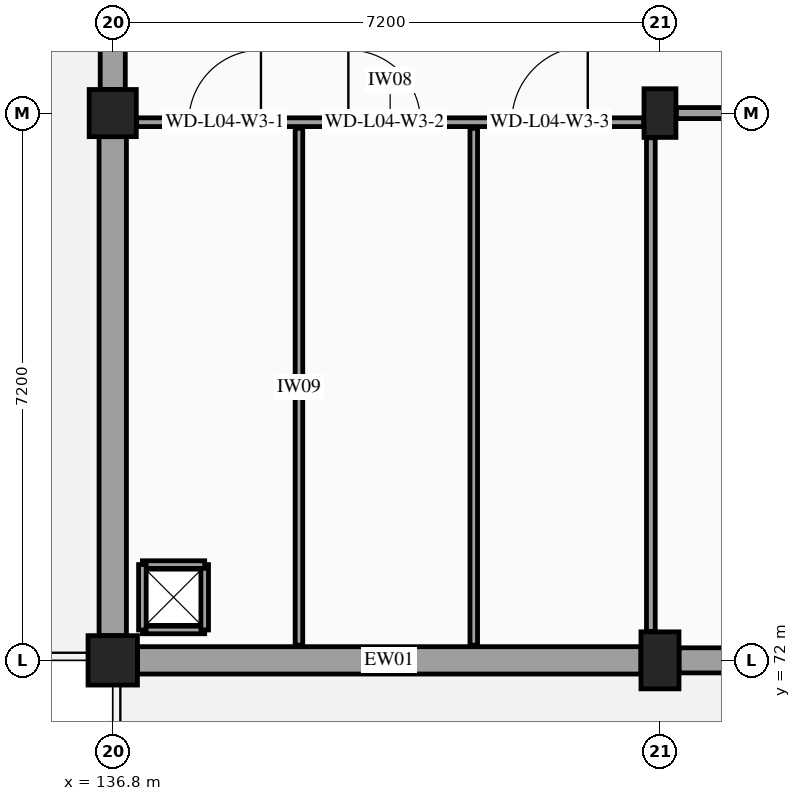
"""IFC4 building model, lengths in metres.
Left out: names, types, materials, properties, quantities, classifications, styles, units other than length and angle.
Written with IfcOpenShell. Run it as: python <this file> out.ifc"""

import sys

from ifc_helpers import new_model, si_unit, direction, frame, frame_2d, origin, origin_2d, place, context, subcontext, project, spatial, rectangle, extrude, element, fill, save


model = new_model("IFC4")
c1 = context("Model", 3, precision=1e-05, world=origin(), true_north=direction((0.0, 1.0)))
c2 = subcontext(c1, "Body", "Model", "MODEL_VIEW")
j1 = project(units=[si_unit("LENGTHUNIT", "METRE"), si_unit("PLANEANGLEUNIT", "RADIAN")], contexts=[c1])
p1 = place(None, origin())
s1 = spatial("IfcSite", under=j1, at=p1, CompositionType="ELEMENT")
p2 = place(p1, origin())
s2 = spatial("IfcBuilding", under=s1, at=p2, CompositionType="ELEMENT")
p3 = place(p2, frame((0.0, 0.0, 18.6)))
s3 = spatial("IfcBuildingStorey", under=s2, at=p3, CompositionType="ELEMENT", Elevation=18.6)
p4 = place(p3, frame((136.8, 72.0, 0.0), z_axis=(0.0, 0.0, 1.0), x_axis=(1.0, 0.0, 0.0)))
e1 = element("IfcColumn", 1, at=p4, inside=s3, PredefinedType="COLUMN", context=c2, shape_type="SweptSolid", body=[
    extrude(rectangle(XDim=0.65, YDim=0.65, at=origin_2d()), origin(), (0.0, 0.0, 1.0), 4.2),
])
p5 = place(p3, frame((136.8, 79.2, 0.0), z_axis=(0.0, 0.0, 1.0), x_axis=(1.0, 0.0, 0.0)))
e2 = element("IfcColumn", 2, at=p5, inside=s3, PredefinedType="COLUMN", context=c2, shape_type="SweptSolid", body=[
    extrude(rectangle(XDim=0.62, YDim=0.62, at=origin_2d()), origin(), (0.0, 0.0, 1.0), 4.2),
])
p6 = place(p3, frame((144.0, 72.0, 0.0), z_axis=(0.0, 0.0, 1.0), x_axis=(1.0, 0.0, 0.0)))
e3 = element("IfcColumn", 3, at=p6, inside=s3, PredefinedType="COLUMN", context=c2, shape_type="SweptSolid", body=[
    extrude(rectangle(XDim=0.5, YDim=0.75, at=origin_2d()), origin(), (0.0, 0.0, 1.0), 4.2),
])
p7 = place(p3, frame((144.0, 79.2, 0.0), z_axis=(0.0, 0.0, 1.0), x_axis=(1.0, 0.0, 0.0)))
e4 = element("IfcColumn", 4, at=p7, inside=s3, PredefinedType="PILASTER", context=c2, shape_type="SweptSolid", body=[
    extrude(rectangle(XDim=0.42, YDim=0.64, at=origin_2d()), origin(), (0.0, 0.0, 1.0), 4.2),
])
p8 = place(p3, frame((150.875, 72.0, 0.0), z_axis=(0.0, 0.0, 1.0), x_axis=(-1.0, 0.0, 0.0)))
e5 = element("IfcWall", 5, at=p8, inside=s3, PredefinedType="STANDARD", context=c2, shape_type="SweptSolid", body=[
    extrude(rectangle(XDim=6.625, YDim=0.33, at=frame_2d((3.312, 0.0))), origin(), (0.0, 0.0, 1.0), 3.21),
])
p9 = place(p8, frame((1.712, 0.0, 0.95)))
e6 = element("IfcOpeningElement", 6, at=p9, cuts=e5, PredefinedType="OPENING", context=c2, shape_type="SweptSolid", body=[
    extrude(rectangle(XDim=3.2, YDim=1.45, at=frame_2d((1.6, 0.725))), frame((0.0, 0.175, 0.0), z_axis=(0.0, -1.0, 0.0), x_axis=(1.0, 0.0, 0.0)), (0.0, 0.0, 1.0), 0.35),
])
p10 = place(p3, frame((143.75, 72.0, 0.0), z_axis=(0.0, 0.0, 1.0), x_axis=(-1.0, 0.0, 0.0)))
e7 = element("IfcWall", 7, at=p10, inside=s3, PredefinedType="STANDARD", context=c2, shape_type="SweptSolid", body=[
    extrude(rectangle(XDim=6.625, YDim=0.36, at=frame_2d((3.312, 0.0))), origin(), (0.0, 0.0, 1.0), 3.21),
])
p11 = place(p3, frame((136.8, 72.325, 0.0), z_axis=(0.0, 0.0, 1.0), x_axis=(0.0, 1.0, 0.0)))
e8 = element("IfcWall", 8, at=p11, inside=s3, PredefinedType="STANDARD", context=c2, shape_type="SweptSolid", body=[
    extrude(rectangle(XDim=6.565, YDim=0.36, at=frame_2d((3.282, 0.0))), origin(), (0.0, 0.0, 1.0), 3.16),
])
p12 = place(p3, frame((136.8, 79.51, 0.0), z_axis=(0.0, 0.0, 1.0), x_axis=(0.0, 1.0, 0.0)))
e9 = element("IfcWall", 9, at=p12, inside=s3, PredefinedType="STANDARD", context=c2, shape_type="SweptSolid", body=[
    extrude(rectangle(XDim=6.59, YDim=0.33, at=frame_2d((3.295, 0.0))), origin(), (0.0, 0.0, 1.0), 3.16),
])
p13 = place(p12, frame((2.745, 0.0, 0.0)))
e10 = element("IfcOpeningElement", 10, at=p13, cuts=e9, PredefinedType="OPENING", context=c2, shape_type="SweptSolid", body=[
    extrude(rectangle(XDim=1.1, YDim=2.2, at=frame_2d((0.55, 1.1))), frame((0.0, 0.175, 0.0), z_axis=(0.0, -1.0, 0.0), x_axis=(1.0, 0.0, 0.0)), (0.0, 0.0, 1.0), 0.35),
])
p14 = place(p3, frame((137.115, 79.08, 0.0), z_axis=(0.0, 0.0, 1.0), x_axis=(1.0, 0.0, 0.0)))
e11 = element("IfcWall", 11, at=p14, inside=s3, PredefinedType="PARTITIONING", context=c2, shape_type="SweptSolid", body=[
    extrude(rectangle(XDim=6.67, YDim=0.115, at=frame_2d((3.335, 0.0))), origin(), (0.0, 0.0, 1.0), 3.24),
])
p15 = place(p14, frame((0.685, 0.0, 0.0)))
e12 = element("IfcOpeningElement", 12, at=p15, cuts=e11, PredefinedType="OPENING", context=c2, shape_type="SweptSolid", body=[
    extrude(rectangle(XDim=0.95, YDim=2.1, at=frame_2d((0.475, 1.05))), frame((0.0, 0.067, 0.0), z_axis=(0.0, -1.0, 0.0), x_axis=(1.0, 0.0, 0.0)), (0.0, 0.0, 1.0), 0.135),
])
p16 = place(p14, frame((2.785, 0.0, 0.0)))
e13 = element("IfcOpeningElement", 13, at=p16, cuts=e11, PredefinedType="OPENING", context=c2, shape_type="SweptSolid", body=[
    extrude(rectangle(XDim=0.95, YDim=2.1, at=frame_2d((0.475, 1.05))), frame((0.0, 0.067, 0.0), z_axis=(0.0, -1.0, 0.0), x_axis=(1.0, 0.0, 0.0)), (0.0, 0.0, 1.0), 0.135),
])
p17 = place(p14, frame((4.935, 0.0, 0.0)))
e14 = element("IfcOpeningElement", 14, at=p17, cuts=e11, PredefinedType="OPENING", context=c2, shape_type="SweptSolid", body=[
    extrude(rectangle(XDim=1.0, YDim=2.15, at=frame_2d((0.5, 1.075))), frame((0.0, 0.067, 0.0), z_axis=(0.0, -1.0, 0.0), x_axis=(1.0, 0.0, 0.0)), (0.0, 0.0, 1.0), 0.135),
])
p18 = place(p3, frame((143.88, 72.38, 0.0), z_axis=(0.0, 0.0, 1.0), x_axis=(0.0, 1.0, 0.0)))
e15 = element("IfcWall", 15, at=p18, inside=s3, PredefinedType="PARTITIONING", context=c2, shape_type="SweptSolid", body=[
    extrude(rectangle(XDim=6.495, YDim=0.115, at=frame_2d((3.248, 0.0))), origin(), (0.0, 0.0, 1.0), 3.33),
])
for number, where, z_axis, x_axis in (
    (16, (139.25, 72.2, 0.0), (0.0, 0.0, 1.0), (0.0, 1.0, 0.0)),
    (17, (141.55, 72.2, 0.0), (0.0, 0.0, 1.0), (0.0, 1.0, 0.0)),
):
    element("IfcWall", number, at=place(p3, frame(where, z_axis=z_axis, x_axis=x_axis)), inside=s3, PredefinedType="PARTITIONING", context=c2, shape_type="SweptSolid", body=[
        extrude(rectangle(XDim=6.8, YDim=0.1, at=frame_2d((3.4, 0.0))), origin(), (0.0, 0.0, 1.0), 3.955),
    ])
p19 = place(p3, frame((137.19, 72.4, 0.0), z_axis=(0.0, 0.0, 1.0), x_axis=(1.0, 0.0, 0.0)))
e18 = element("IfcWall", 18, at=p19, inside=s3, PredefinedType="PARTITIONING", context=c2, shape_type="SweptSolid", body=[
    extrude(rectangle(XDim=0.82, YDim=0.1, at=frame_2d((0.41, 0.0))), origin(), (0.0, 0.0, 1.0), 3.955),
])
p20 = place(p3, frame((138.01, 72.4, 0.0), z_axis=(0.0, 0.0, 1.0), x_axis=(0.0, 1.0, 0.0)))
e19 = element("IfcWall", 19, at=p20, inside=s3, PredefinedType="PARTITIONING", context=c2, shape_type="SweptSolid", body=[
    extrude(rectangle(XDim=0.86, YDim=0.1, at=frame_2d((0.43, 0.0))), origin(), (0.0, 0.0, 1.0), 3.955),
])
p21 = place(p3, frame((138.01, 73.26, 0.0), z_axis=(0.0, 0.0, 1.0), x_axis=(-1.0, 0.0, 0.0)))
e20 = element("IfcWall", 20, at=p21, inside=s3, PredefinedType="PARTITIONING", context=c2, shape_type="SweptSolid", body=[
    extrude(rectangle(XDim=0.82, YDim=0.1, at=frame_2d((0.41, 0.0))), origin(), (0.0, 0.0, 1.0), 3.955),
])
p22 = place(p3, frame((137.19, 73.26, 0.0), z_axis=(0.0, 0.0, 1.0), x_axis=(0.0, -1.0, 0.0)))
e21 = element("IfcWall", 21, at=p22, inside=s3, PredefinedType="PARTITIONING", context=c2, shape_type="SweptSolid", body=[
    extrude(rectangle(XDim=0.86, YDim=0.1, at=frame_2d((0.43, 0.0))), origin(), (0.0, 0.0, 1.0), 3.955),
])
p23 = place(p3, frame((144.215, 79.2, 0.0), z_axis=(0.0, 0.0, 1.0), x_axis=(1.0, 0.0, 0.0)))
e22 = element("IfcWall", 22, at=p23, inside=s3, PredefinedType="PARTITIONING", context=c2, shape_type="SweptSolid", body=[
    extrude(rectangle(XDim=6.67, YDim=0.145, at=frame_2d((3.335, 0.0))), origin(), (0.0, 0.0, 1.0), 3.245),
])
p24 = place(p23, frame((2.375, 0.0, 0.0)))
e23 = element("IfcOpeningElement", 23, at=p24, cuts=e22, PredefinedType="OPENING", context=c2, shape_type="SweptSolid", body=[
    extrude(rectangle(XDim=1.92, YDim=2.35, at=frame_2d((0.96, 1.175))), frame((0.0, 0.083, 0.0), z_axis=(0.0, -1.0, 0.0), x_axis=(1.0, 0.0, 0.0)), (0.0, 0.0, 1.0), 0.165),
])
p25 = place(p15, origin())
e24 = element("IfcDoor", 24, at=p25, inside=s3, OperationType="SINGLE_SWING_RIGHT", PredefinedType="DOOR", context=c2, shape_type="SweptSolid", body=[
    extrude(rectangle(XDim=0.95, YDim=2.1, at=frame_2d((0.475, 1.05))), frame((0.0, 0.025, 0.0), z_axis=(0.0, -1.0, 0.0), x_axis=(1.0, 0.0, 0.0)), (0.0, 0.0, 1.0), 0.05),
])
fill(e12, e24)
p26 = place(p16, origin())
e25 = element("IfcDoor", 25, at=p26, inside=s3, OperationType="SINGLE_SWING_LEFT", PredefinedType="DOOR", context=c2, shape_type="SweptSolid", body=[
    extrude(rectangle(XDim=0.95, YDim=2.1, at=frame_2d((0.475, 1.05))), frame((0.0, 0.025, 0.0), z_axis=(0.0, -1.0, 0.0), x_axis=(1.0, 0.0, 0.0)), (0.0, 0.0, 1.0), 0.05),
])
fill(e13, e25)
p27 = place(p17, origin())
e26 = element("IfcDoor", 26, at=p27, inside=s3, OperationType="SINGLE_SWING_RIGHT", PredefinedType="DOOR", context=c2, shape_type="SweptSolid", body=[
    extrude(rectangle(XDim=1.0, YDim=2.15, at=frame_2d((0.5, 1.075))), frame((0.0, 0.025, 0.0), z_axis=(0.0, -1.0, 0.0), x_axis=(1.0, 0.0, 0.0)), (0.0, 0.0, 1.0), 0.05),
])
fill(e14, e26)
save(model, sys.argv[1])
